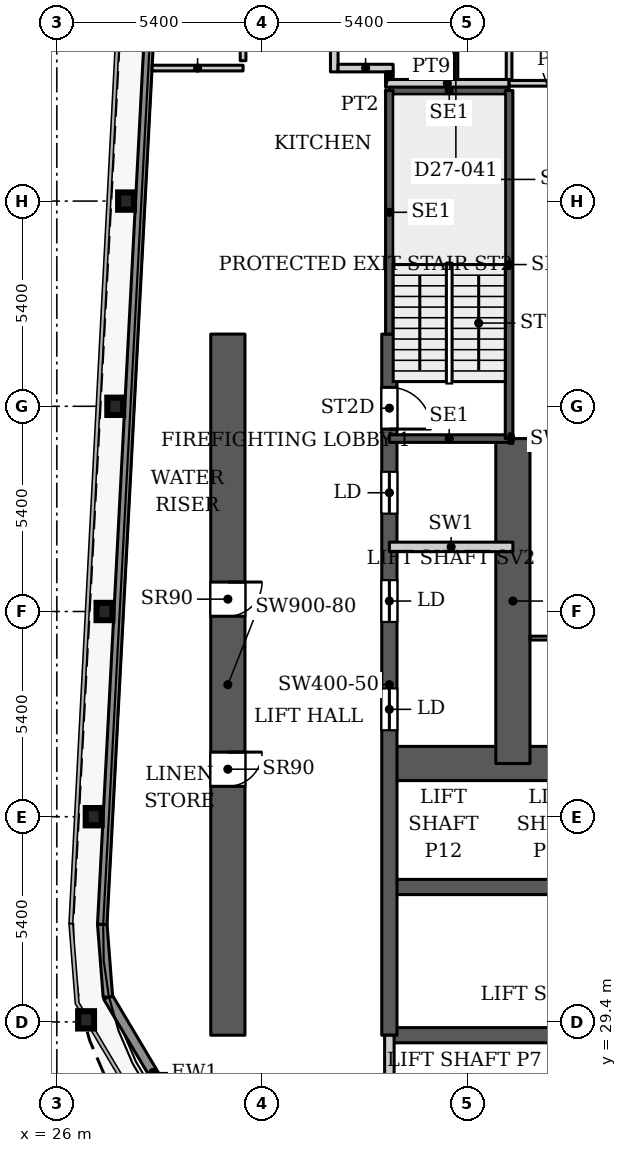
"""IFC4 building model, lengths in metres.
Left out: names, types, materials, properties, quantities, classifications, styles, units other than length and angle.
Written with IfcOpenShell. Run it as: python <this file> out.ifc"""

import sys

from ifc_helpers import new_model, si_unit, direction, frame, frame_2d, origin, origin_2d, place, context, subcontext, project, spatial, rectangle, i_section, extrude, source, transform, mapped, element, fill, save


model = new_model("IFC4")
c1 = context("Model", 3, precision=1e-05, world=origin(), true_north=direction((0.0, 1.0)))
c2 = subcontext(c1, "Body", "Model", "MODEL_VIEW")
j1 = project(units=[si_unit("LENGTHUNIT", "METRE"), si_unit("PLANEANGLEUNIT", "RADIAN")], contexts=[c1])
p1 = place(None, origin())
s1 = spatial("IfcSite", under=j1, at=p1, CompositionType="ELEMENT")
p2 = place(p1, origin())
s2 = spatial("IfcBuilding", under=s1, at=p2, CompositionType="ELEMENT")
p3 = place(p2, frame((0.0, 0.0, 121.4)))
s3 = spatial("IfcBuildingStorey", under=s2, at=p3, CompositionType="ELEMENT", Elevation=121.4)
for number, where, z_axis, x_axis in (
    (1, (26.769, 29.454, 0.0), (0.0, 0.0, 1.0), (1.0, 0.0, 0.0)),
    (2, (26.969, 34.8, 0.0), (0.0, 0.0, 1.0), (1.0, 0.0, 0.0)),
    (3, (27.253, 40.2, 0.0), (0.0, 0.0, 1.0), (1.0, 0.0, 0.0)),
    (4, (27.537, 45.6, 0.0), (0.0, 0.0, 1.0), (1.0, 0.0, 0.0)),
    (5, (27.822, 51.0, 0.0), (0.0, 0.0, 1.0), (1.0, 0.0, 0.0)),
):
    element("IfcColumn", number, at=place(p3, frame(where, z_axis=z_axis, x_axis=x_axis)), inside=s3, PredefinedType="COLUMN", context=c2, shape_type="SweptSolid", body=[
        extrude(i_section(OverallWidth=0.418, OverallDepth=0.455, WebThickness=0.042, FlangeThickness=0.068, FilletRadius=0.014, at=origin_2d()), origin(), (0.0, 0.0, 1.0), 3.9),
    ])
p4 = place(p3, frame((34.75, 29.05, 0.0), z_axis=(0.0, 0.0, 1.0), x_axis=(1.0, 0.0, 0.0)))
e6 = element("IfcWall", 6, at=p4, inside=s3, PredefinedType="SHEAR", context=c2, shape_type="SweptSolid", body=[
    extrude(rectangle(XDim=18.4, YDim=0.4, at=frame_2d((9.2, 0.0))), origin(), (0.0, 0.0, 1.0), 3.9),
])
p5 = place(p4, frame((15.125, 0.0, 0.0)))
e7 = element("IfcOpeningElement", 7, at=p5, cuts=e6, PredefinedType="OPENING", context=c2, shape_type="SweptSolid", body=[
    extrude(rectangle(XDim=1.1, YDim=2.2, at=frame_2d((0.55, 1.1))), frame((0.0, 0.21, 0.0), z_axis=(0.0, -1.0, 0.0), x_axis=(1.0, 0.0, 0.0)), (0.0, 0.0, 1.0), 0.42),
])
p6 = place(p3, frame((34.75, 32.95, 0.0), z_axis=(0.0, 0.0, 1.0), x_axis=(1.0, 0.0, 0.0)))
e8 = element("IfcWall", 8, at=p6, inside=s3, PredefinedType="SHEAR", context=c2, shape_type="SweptSolid", body=[
    extrude(rectangle(XDim=14.25, YDim=0.4, at=frame_2d((7.125, 0.0))), origin(), (0.0, 0.0, 1.0), 3.9),
])
p7 = place(p3, frame((34.75, 36.2, 0.0), z_axis=(0.0, 0.0, 1.0), x_axis=(1.0, 0.0, 0.0)))
e9 = element("IfcWall", 9, at=p7, inside=s3, PredefinedType="SHEAR", context=c2, shape_type="SweptSolid", body=[
    extrude(rectangle(XDim=18.4, YDim=0.9, at=frame_2d((9.2, 0.0))), origin(), (0.0, 0.0, 1.0), 3.9),
])
p8 = place(p7, frame((16.9, 0.0, 0.0)))
e10 = element("IfcOpeningElement", 10, at=p8, cuts=e9, PredefinedType="OPENING", context=c2, shape_type="SweptSolid", body=[
    extrude(rectangle(XDim=1.0, YDim=2.2, at=frame_2d((0.5, 1.1))), frame((0.0, 0.46, 0.0), z_axis=(0.0, -1.0, 0.0), x_axis=(1.0, 0.0, 0.0)), (0.0, 0.0, 1.0), 0.92),
])
p9 = place(p3, frame((34.75, 29.05, 0.0), z_axis=(0.0, 0.0, 1.0), x_axis=(0.0, 1.0, 0.0)))
e11 = element("IfcWall", 11, at=p9, inside=s3, PredefinedType="SHEAR", context=c2, shape_type="SweptSolid", body=[
    extrude(rectangle(XDim=18.45, YDim=0.4, at=frame_2d((9.225, 0.0))), origin(), (0.0, 0.0, 1.0), 3.9),
])
p10 = place(p9, frame((8.025, 0.0, 0.0)))
e12 = element("IfcOpeningElement", 12, at=p10, cuts=e11, PredefinedType="OPENING", context=c2, shape_type="SweptSolid", body=[
    extrude(rectangle(XDim=1.1, YDim=2.2, at=frame_2d((0.55, 1.1))), frame((0.0, 0.21, 0.0), z_axis=(0.0, -1.0, 0.0), x_axis=(1.0, 0.0, 0.0)), (0.0, 0.0, 1.0), 0.42),
])
p11 = place(p9, frame((10.875, 0.0, 0.0)))
e13 = element("IfcOpeningElement", 13, at=p11, cuts=e11, PredefinedType="OPENING", context=c2, shape_type="SweptSolid", body=[
    extrude(rectangle(XDim=1.1, YDim=2.2, at=frame_2d((0.55, 1.1))), frame((0.0, 0.21, 0.0), z_axis=(0.0, -1.0, 0.0), x_axis=(1.0, 0.0, 0.0)), (0.0, 0.0, 1.0), 0.42),
])
p12 = place(p9, frame((13.725, 0.0, 0.0)))
e14 = element("IfcOpeningElement", 14, at=p12, cuts=e11, PredefinedType="OPENING", context=c2, shape_type="SweptSolid", body=[
    extrude(rectangle(XDim=1.1, YDim=2.2, at=frame_2d((0.55, 1.1))), frame((0.0, 0.21, 0.0), z_axis=(0.0, -1.0, 0.0), x_axis=(1.0, 0.0, 0.0)), (0.0, 0.0, 1.0), 0.42),
])
p13 = place(p9, frame((15.95, 0.0, 0.0)))
e15 = element("IfcOpeningElement", 15, at=p13, cuts=e11, PredefinedType="OPENING", context=c2, shape_type="SweptSolid", body=[
    extrude(rectangle(XDim=1.1, YDim=2.2, at=frame_2d((0.55, 1.1))), frame((0.0, 0.21, 0.0), z_axis=(0.0, -1.0, 0.0), x_axis=(1.0, 0.0, 0.0)), (0.0, 0.0, 1.0), 0.42),
])
p14 = place(p3, frame((38.0, 36.2, 0.0), z_axis=(0.0, 0.0, 1.0), x_axis=(0.0, 1.0, 0.0)))
e16 = element("IfcWall", 16, at=p14, inside=s3, PredefinedType="SHEAR", context=c2, shape_type="SweptSolid", body=[
    extrude(rectangle(XDim=8.55, YDim=0.9, at=frame_2d((4.275, 0.0))), origin(), (0.0, 0.0, 1.0), 3.9),
])
p15 = place(p3, frame((30.5, 29.05, 0.0), z_axis=(0.0, 0.0, 1.0), x_axis=(0.0, 1.0, 0.0)))
e17 = element("IfcWall", 17, at=p15, inside=s3, PredefinedType="SHEAR", context=c2, shape_type="SweptSolid", body=[
    extrude(rectangle(XDim=18.45, YDim=0.9, at=frame_2d((9.225, 0.0))), origin(), (0.0, 0.0, 1.0), 3.9),
])
p16 = place(p15, frame((6.55, 0.0, 0.0)))
e18 = element("IfcOpeningElement", 18, at=p16, cuts=e17, PredefinedType="OPENING", context=c2, shape_type="SweptSolid", body=[
    extrude(rectangle(XDim=0.9, YDim=2.2, at=frame_2d((0.45, 1.1))), frame((0.0, 0.46, 0.0), z_axis=(0.0, -1.0, 0.0), x_axis=(1.0, 0.0, 0.0)), (0.0, 0.0, 1.0), 0.92),
])
p17 = place(p15, frame((11.025, 0.0, 0.0)))
e19 = element("IfcOpeningElement", 19, at=p17, cuts=e17, PredefinedType="OPENING", context=c2, shape_type="SweptSolid", body=[
    extrude(rectangle(XDim=0.9, YDim=2.2, at=frame_2d((0.45, 1.1))), frame((0.0, 0.46, 0.0), z_axis=(0.0, -1.0, 0.0), x_axis=(1.0, 0.0, 0.0)), (0.0, 0.0, 1.0), 0.92),
])
p18 = place(p3, frame((29.712, 26.072, 0.0), z_axis=(0.0, 0.0, 1.0), x_axis=(-0.511028049012, 0.859564036662, 0.0)))
e20 = element("IfcWall", 20, at=p18, inside=s3, PredefinedType="SOLIDWALL", context=c2, shape_type="SweptSolid", body=[
    extrude(rectangle(XDim=4.634, YDim=0.25, at=frame_2d((2.317, 0.0))), origin(), (0.0, 0.0, 1.0), 3.147),
])
p19 = place(p3, frame((27.344, 30.055, 0.0), z_axis=(0.0, 0.0, 1.0), x_axis=(-0.077571675317, 0.99698677784, 0.0)))
e21 = element("IfcWall", 21, at=p19, inside=s3, PredefinedType="SOLIDWALL", context=c2, shape_type="SweptSolid", body=[
    extrude(rectangle(XDim=1.92, YDim=0.25, at=frame_2d((0.96, 0.0))), origin(), (0.0, 0.0, 1.0), 3.75),
])
p20 = place(p3, frame((27.195, 31.969, 0.0), z_axis=(0.0, 0.0, 1.0), x_axis=(0.052554995867, 0.998618031286, 0.0)))
e22 = element("IfcWall", 22, at=p20, inside=s3, PredefinedType="SOLIDWALL", context=c2, shape_type="SweptSolid", body=[
    extrude(rectangle(XDim=66.787, YDim=0.25, at=frame_2d((33.394, 0.0))), origin(), (0.0, 0.0, 1.0), 3.75),
])
for number, where, z_axis, x_axis in (
    (23, (34.75, 44.75, 0.0), (0.0, 0.0, 1.0), (1.0, 0.0, 0.0)),
    (24, (34.75, 53.91, 0.0), (0.0, 0.0, 1.0), (1.0, 0.0, 0.0)),
):
    element("IfcWall", number, at=place(p3, frame(where, z_axis=z_axis, x_axis=x_axis)), inside=s3, PredefinedType="SHEAR", context=c2, shape_type="SweptSolid", body=[
        extrude(rectangle(XDim=3.15, YDim=0.2, at=frame_2d((1.575, 0.0))), origin(), (0.0, 0.0, 1.0), 3.9),
    ])
p21 = place(p3, frame((34.75, 47.5, 0.0), z_axis=(0.0, 0.0, 1.0), x_axis=(0.0, 1.0, 0.0)))
e25 = element("IfcWall", 25, at=p21, inside=s3, PredefinedType="SHEAR", context=c2, shape_type="SweptSolid", body=[
    extrude(rectangle(XDim=6.41, YDim=0.2, at=frame_2d((3.205, 0.0))), origin(), (0.0, 0.0, 1.0), 3.9),
])
p22 = place(p3, frame((37.9, 44.75, 0.0), z_axis=(0.0, 0.0, 1.0), x_axis=(0.0, 1.0, 0.0)))
e26 = element("IfcWall", 26, at=p22, inside=s3, PredefinedType="SHEAR", context=c2, shape_type="SweptSolid", body=[
    extrude(rectangle(XDim=9.16, YDim=0.2, at=frame_2d((4.58, 0.0))), origin(), (0.0, 0.0, 1.0), 3.9),
])
for number, where, z_axis, x_axis in (
    (27, (34.75, 25.8, 0.0), (0.0, 0.0, 1.0), (0.0, 1.0, 0.0)),
    (28, (34.75, 41.9, 0.0), (0.0, 0.0, 1.0), (1.0, 0.0, 0.0)),
):
    element("IfcWall", number, at=place(p3, frame(where, z_axis=z_axis, x_axis=x_axis)), inside=s3, PredefinedType="PARTITIONING", context=c2, shape_type="SweptSolid", body=[
        extrude(rectangle(XDim=3.25, YDim=0.25, at=frame_2d((1.625, 0.0))), origin(), (0.0, 0.0, 1.0), 3.9),
    ])
p23 = place(p3, frame((37.9, 44.75, 0.0), z_axis=(0.0, 0.0, 1.0), x_axis=(1.0, 0.0, 0.0)))
e29 = element("IfcWall", 29, at=p23, inside=s3, PredefinedType="PARTITIONING", context=c2, shape_type="SweptSolid", body=[
    extrude(rectangle(XDim=0.1, YDim=0.25, at=frame_2d((0.05, 0.0))), origin(), (0.0, 0.0, 1.0), 3.9),
])
p24 = place(p3, frame((28.508, 54.5, 0.0), z_axis=(0.0, 0.0, 1.0), x_axis=(1.0, 0.0, 0.0)))
e30 = element("IfcWall", 30, at=p24, inside=s3, PredefinedType="PARTITIONING", context=c2, shape_type="SweptSolid", body=[
    extrude(rectangle(XDim=2.392, YDim=0.15, at=frame_2d((1.196, 0.0))), origin(), (0.0, 0.0, 1.0), 3.9),
])
p25 = place(p3, frame((30.9, 54.695, 0.0), z_axis=(0.0, 0.0, 1.0), x_axis=(0.0, 1.0, 0.0)))
e31 = element("IfcWall", 31, at=p25, inside=s3, PredefinedType="PARTITIONING", context=c2, shape_type="SweptSolid", body=[
    extrude(rectangle(XDim=10.105, YDim=0.15, at=frame_2d((5.052, 0.0))), origin(), (0.0, 0.0, 1.0), 3.072),
])
p26 = place(p25, frame((4.505, 0.0, 0.0)))
e32 = element("IfcOpeningElement", 32, at=p26, cuts=e31, PredefinedType="OPENING", context=c2, shape_type="SweptSolid", body=[
    extrude(rectangle(XDim=0.9, YDim=2.2, at=frame_2d((0.45, 1.1))), frame((0.0, 0.085, 0.0), z_axis=(0.0, -1.0, 0.0), x_axis=(1.0, 0.0, 0.0)), (0.0, 0.0, 1.0), 0.17),
])
p27 = place(p3, frame((33.3, 54.4, 0.0), z_axis=(0.0, 0.0, 1.0), x_axis=(0.0, 1.0, 0.0)))
e33 = element("IfcWall", 33, at=p27, inside=s3, PredefinedType="PARTITIONING", context=c2, shape_type="SweptSolid", body=[
    extrude(rectangle(XDim=24.95, YDim=0.2, at=frame_2d((12.475, 0.0))), origin(), (0.0, 0.0, 1.0), 3.6),
])
p28 = place(p27, frame((3.1, 0.0, 0.0)))
e34 = element("IfcOpeningElement", 34, at=p28, cuts=e33, PredefinedType="OPENING", context=c2, shape_type="SweptSolid", body=[
    extrude(rectangle(XDim=1.0, YDim=2.1, at=frame_2d((0.5, 1.05))), frame((0.0, 0.11, 0.0), z_axis=(0.0, -1.0, 0.0), x_axis=(1.0, 0.0, 0.0)), (0.0, 0.0, 1.0), 0.22),
])
p29 = place(p27, frame((14.8, 0.0, 0.0)))
e35 = element("IfcOpeningElement", 35, at=p29, cuts=e33, PredefinedType="OPENING", context=c2, shape_type="SweptSolid", body=[
    extrude(rectangle(XDim=1.0, YDim=2.1, at=frame_2d((0.5, 1.05))), frame((0.0, 0.11, 0.0), z_axis=(0.0, -1.0, 0.0), x_axis=(1.0, 0.0, 0.0)), (0.0, 0.0, 1.0), 0.22),
])
p30 = place(p3, frame((33.4, 54.5, 0.0), z_axis=(0.0, 0.0, 1.0), x_axis=(1.0, 0.0, 0.0)))
e36 = element("IfcWall", 36, at=p30, inside=s3, PredefinedType="PARTITIONING", context=c2, shape_type="SweptSolid", body=[
    extrude(rectangle(XDim=1.45, YDim=0.2, at=frame_2d((0.725, 0.0))), origin(), (0.0, 0.0, 1.0), 3.6),
])
p31 = place(p3, frame((34.65, 54.1, 0.0), z_axis=(0.0, 0.0, 1.0), x_axis=(1.0, 0.0, 0.0)))
e37 = element("IfcWall", 37, at=p31, inside=s3, PredefinedType="PARTITIONING", context=c2, shape_type="SweptSolid", body=[
    extrude(rectangle(XDim=3.25, YDim=0.2, at=frame_2d((1.625, 0.0))), origin(), (0.0, 0.0, 1.0), 3.6),
])
p32 = place(p3, frame((34.75, 54.2, 0.0), z_axis=(0.0, 0.0, 1.0), x_axis=(0.0, 1.0, 0.0)))
e38 = element("IfcWall", 38, at=p32, inside=s3, PredefinedType="PARTITIONING", context=c2, shape_type="SweptSolid", body=[
    extrude(rectangle(XDim=0.2, YDim=0.2, at=frame_2d((0.1, 0.0))), origin(), (0.0, 0.0, 1.0), 3.6),
])
p33 = place(p3, frame((36.5, 54.2, 0.0), z_axis=(0.0, 0.0, 1.0), x_axis=(0.0, 1.0, 0.0)))
e39 = element("IfcWall", 39, at=p33, inside=s3, PredefinedType="PARTITIONING", context=c2, shape_type="SweptSolid", body=[
    extrude(rectangle(XDim=2.85, YDim=0.1, at=frame_2d((1.425, 0.0))), origin(), (0.0, 0.0, 1.0), 3.6),
])
p34 = place(p33, frame((0.95, 0.0, 0.0)))
e40 = element("IfcOpeningElement", 40, at=p34, cuts=e39, PredefinedType="OPENING", context=c2, shape_type="SweptSolid", body=[
    extrude(rectangle(XDim=0.9, YDim=2.1, at=frame_2d((0.45, 1.05))), frame((0.0, 0.06, 0.0), z_axis=(0.0, -1.0, 0.0), x_axis=(1.0, 0.0, 0.0)), (0.0, 0.0, 1.0), 0.12),
])
p35 = place(p3, frame((37.9, 54.1, 0.0), z_axis=(0.0, 0.0, 1.0), x_axis=(1.0, 0.0, 0.0)))
e41 = element("IfcWall", 41, at=p35, inside=s3, PredefinedType="PARTITIONING", context=c2, shape_type="SweptSolid", body=[
    extrude(rectangle(XDim=2.8, YDim=0.15, at=frame_2d((1.4, 0.0))), origin(), (0.0, 0.0, 1.0), 3.6),
])
p36 = place(p3, frame((37.9, 54.2, 0.0), z_axis=(0.0, 0.0, 1.0), x_axis=(0.0, 1.0, 0.0)))
e42 = element("IfcWall", 42, at=p36, inside=s3, PredefinedType="PARTITIONING", context=c2, shape_type="SweptSolid", body=[
    extrude(rectangle(XDim=14.2, YDim=0.15, at=frame_2d((7.1, 0.0))), origin(), (0.0, 0.0, 1.0), 3.6),
])
p37 = place(p36, frame((4.4, 0.0, 0.0)))
e43 = element("IfcOpeningElement", 43, at=p37, cuts=e42, PredefinedType="OPENING", context=c2, shape_type="SweptSolid", body=[
    extrude(rectangle(XDim=0.9, YDim=2.1, at=frame_2d((0.45, 1.05))), frame((0.0, 0.085, 0.0), z_axis=(0.0, -1.0, 0.0), x_axis=(1.0, 0.0, 0.0)), (0.0, 0.0, 1.0), 0.17),
])
p38 = place(p36, frame((9.5, 0.0, 0.0)))
e44 = element("IfcOpeningElement", 44, at=p38, cuts=e42, PredefinedType="OPENING", context=c2, shape_type="SweptSolid", body=[
    extrude(rectangle(XDim=0.9, YDim=2.1, at=frame_2d((0.45, 1.05))), frame((0.0, 0.085, 0.0), z_axis=(0.0, -1.0, 0.0), x_axis=(1.0, 0.0, 0.0)), (0.0, 0.0, 1.0), 0.17),
])
p39 = place(p36, frame((12.3, 0.0, 0.0)))
e45 = element("IfcOpeningElement", 45, at=p39, cuts=e42, PredefinedType="OPENING", context=c2, shape_type="SweptSolid", body=[
    extrude(rectangle(XDim=1.0, YDim=2.1, at=frame_2d((0.5, 1.05))), frame((0.0, 0.085, 0.0), z_axis=(0.0, -1.0, 0.0), x_axis=(1.0, 0.0, 0.0)), (0.0, 0.0, 1.0), 0.17),
])
p40 = place(p36, frame((6.95, 0.0, 0.0)))
e46 = element("IfcOpeningElement", 46, at=p40, cuts=e42, PredefinedType="OPENING", context=c2, shape_type="SweptSolid", body=[
    extrude(rectangle(XDim=0.9, YDim=2.1, at=frame_2d((0.45, 1.05))), frame((0.0, 0.085, 0.0), z_axis=(0.0, -1.0, 0.0), x_axis=(1.0, 0.0, 0.0)), (0.0, 0.0, 1.0), 0.17),
])
p41 = place(p36, frame((2.3, 0.0, 0.0)))
e47 = element("IfcOpeningElement", 47, at=p41, cuts=e42, PredefinedType="OPENING", context=c2, shape_type="SweptSolid", body=[
    extrude(rectangle(XDim=0.9, YDim=2.1, at=frame_2d((0.45, 1.05))), frame((0.0, 0.085, 0.0), z_axis=(0.0, -1.0, 0.0), x_axis=(1.0, 0.0, 0.0)), (0.0, 0.0, 1.0), 0.17),
])
p42 = place(p3, frame((38.449, 39.5, 0.0), z_axis=(0.0, 0.0, 1.0), x_axis=(1.0, 0.0, 0.0)))
e48 = element("IfcWall", 48, at=p42, inside=s3, PredefinedType="PARTITIONING", context=c2, shape_type="SweptSolid", body=[
    extrude(rectangle(XDim=14.851, YDim=0.1, at=frame_2d((7.426, 0.0))), origin(), (0.0, 0.0, 1.0), 3.6),
])
p43 = place(p42, frame((4.047, 0.0, 0.0)))
e49 = element("IfcOpeningElement", 49, at=p43, cuts=e48, PredefinedType="OPENING", context=c2, shape_type="SweptSolid", body=[
    extrude(rectangle(XDim=1.0, YDim=2.1, at=frame_2d((0.5, 1.05))), frame((0.0, 0.06, 0.0), z_axis=(0.0, -1.0, 0.0), x_axis=(1.0, 0.0, 0.0)), (0.0, 0.0, 1.0), 0.12),
])
m1 = source(origin(), c2, "Body", "SweptSolid", [
    extrude(rectangle(XDim=1.1, YDim=2.2, at=frame_2d((0.55, 1.1))), frame((0.0, 0.025, 0.0), z_axis=(0.0, -1.0, 0.0), x_axis=(1.0, 0.0, 0.0)), (0.0, 0.0, 1.0), 0.05),
])
p44 = place(p10, origin())
e50 = element("IfcDoor", 50, at=p44, inside=s3, OperationType="SLIDING_TO_LEFT", PredefinedType="DOOR", context=c2, shape_type="MappedRepresentation", body=[
    mapped(m1, transform((0.0, 0.0, 0.0), x_axis=(1.0, 0.0, 0.0), y_axis=(0.0, 1.0, 0.0), z_axis=(0.0, 0.0, 1.0), scale=1.0)),
])
fill(e12, e50)
p45 = place(p11, origin())
e51 = element("IfcDoor", 51, at=p45, inside=s3, OperationType="SLIDING_TO_LEFT", PredefinedType="DOOR", context=c2, shape_type="MappedRepresentation", body=[
    mapped(m1, transform((0.0, 0.0, 0.0), x_axis=(1.0, 0.0, 0.0), y_axis=(0.0, 1.0, 0.0), z_axis=(0.0, 0.0, 1.0), scale=1.0)),
])
fill(e13, e51)
p46 = place(p12, origin())
e52 = element("IfcDoor", 52, at=p46, inside=s3, OperationType="SLIDING_TO_LEFT", PredefinedType="DOOR", context=c2, shape_type="MappedRepresentation", body=[
    mapped(m1, transform((0.0, 0.0, 0.0), x_axis=(1.0, 0.0, 0.0), y_axis=(0.0, 1.0, 0.0), z_axis=(0.0, 0.0, 1.0), scale=1.0)),
])
fill(e14, e52)
m2 = source(origin(), c2, "Body", "SweptSolid", [
    extrude(rectangle(XDim=0.9, YDim=2.2, at=frame_2d((0.45, 1.1))), frame((0.0, 0.025, 0.0), z_axis=(0.0, -1.0, 0.0), x_axis=(1.0, 0.0, 0.0)), (0.0, 0.0, 1.0), 0.05),
])
p47 = place(p16, origin())
e53 = element("IfcDoor", 53, at=p47, inside=s3, OperationType="SINGLE_SWING_RIGHT", PredefinedType="DOOR", context=c2, shape_type="MappedRepresentation", body=[
    mapped(m2, transform((0.0, 0.0, 0.0), x_axis=(1.0, 0.0, 0.0), y_axis=(0.0, 1.0, 0.0), z_axis=(0.0, 0.0, 1.0), scale=1.0)),
])
fill(e18, e53)
p48 = place(p17, origin())
e54 = element("IfcDoor", 54, at=p48, inside=s3, OperationType="SINGLE_SWING_RIGHT", PredefinedType="DOOR", context=c2, shape_type="MappedRepresentation", body=[
    mapped(m2, transform((0.0, 0.0, 0.0), x_axis=(1.0, 0.0, 0.0), y_axis=(0.0, 1.0, 0.0), z_axis=(0.0, 0.0, 1.0), scale=1.0)),
])
fill(e19, e54)
m3 = source(origin(), c2, "Body", "SweptSolid", [
    extrude(rectangle(XDim=1.1, YDim=2.2, at=frame_2d((0.55, 1.1))), frame((0.0, 0.025, 0.0), z_axis=(0.0, -1.0, 0.0), x_axis=(1.0, 0.0, 0.0)), (0.0, 0.0, 1.0), 0.05),
])
p49 = place(p13, origin())
e55 = element("IfcDoor", 55, at=p49, inside=s3, OperationType="SINGLE_SWING_RIGHT", PredefinedType="DOOR", context=c2, shape_type="MappedRepresentation", body=[
    mapped(m3, transform((0.0, 0.0, 0.0), x_axis=(1.0, 0.0, 0.0), y_axis=(0.0, 1.0, 0.0), z_axis=(0.0, 0.0, 1.0), scale=1.0)),
])
fill(e15, e55)
save(model, sys.argv[1])
